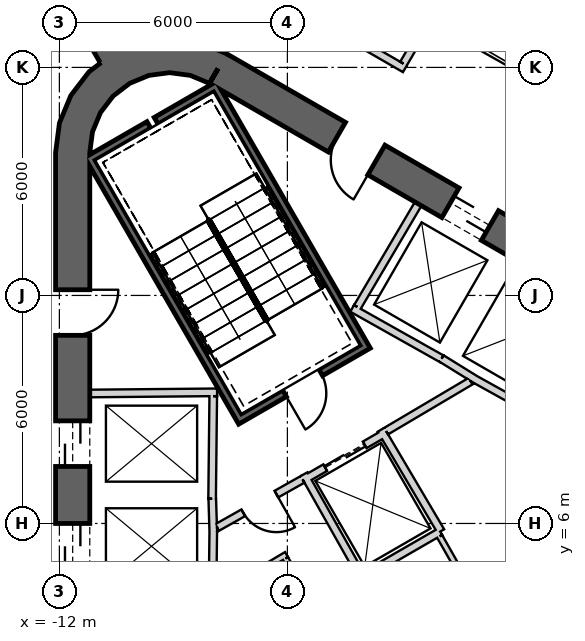
"""IFC4 building model, lengths in metres.
Left out: names, types, materials, properties, quantities, classifications, styles, units other than length and angle.
Written with IfcOpenShell. Run it as: python <this file> out.ifc"""

import sys

from ifc_helpers import new_model, si_unit, direction, frame, frame_2d, origin, place, context, subcontext, project, spatial, polyline, rectangle, outline, extrude, element, fill, save


model = new_model("IFC4")
c1 = context("Model", 3, precision=1e-05, world=origin(), true_north=direction((0.0, 1.0)))
c2 = subcontext(c1, "Body", "Model", "MODEL_VIEW")
j1 = project(units=[si_unit("LENGTHUNIT", "METRE"), si_unit("PLANEANGLEUNIT", "RADIAN")], contexts=[c1])
p1 = place(None, origin())
s1 = spatial("IfcSite", under=j1, at=p1, CompositionType="ELEMENT")
p2 = place(p1, origin())
s2 = spatial("IfcBuilding", under=s1, at=p2, CompositionType="ELEMENT")
p3 = place(p2, frame((0.0, 0.0, 27.5)))
s3 = spatial("IfcBuildingStorey", under=s2, at=p3, CompositionType="ELEMENT", Elevation=27.5)
p4 = place(p3, frame((19.475, 2.208, 0.0), z_axis=(0.0, 0.0, 1.0), x_axis=(-0.866028369851, 0.499994862586, 0.0)))
e1 = element("IfcWall", 1, at=p4, inside=s3, PredefinedType="SHEAR", context=c2, shape_type="SweptSolid", body=[
    extrude(rectangle(XDim=31.523, YDim=0.9, at=frame_2d((15.762, 0.0))), origin(), (0.0, 0.0, 1.0), 6.0),
])
p5 = place(p4, frame((7.062, 0.0, 0.0)))
e2 = element("IfcOpeningElement", 2, at=p5, cuts=e1, PredefinedType="OPENING", context=c2, shape_type="SweptSolid", body=[
    extrude(rectangle(XDim=1.2, YDim=2.4, at=frame_2d((0.6, 1.2))), frame((0.0, 0.46, 0.0), z_axis=(0.0, -1.0, 0.0), x_axis=(1.0, 0.0, 0.0)), (0.0, 0.0, 1.0), 0.92),
])
p6 = place(p4, frame((9.762, 0.0, 0.0)))
e3 = element("IfcOpeningElement", 3, at=p6, cuts=e1, PredefinedType="OPENING", context=c2, shape_type="SweptSolid", body=[
    extrude(rectangle(XDim=1.2, YDim=2.4, at=frame_2d((0.6, 1.2))), frame((0.0, 0.46, 0.0), z_axis=(0.0, -1.0, 0.0), x_axis=(1.0, 0.0, 0.0)), (0.0, 0.0, 1.0), 0.92),
])
p7 = place(p4, frame((12.462, 0.0, 0.0)))
e4 = element("IfcOpeningElement", 4, at=p7, cuts=e1, PredefinedType="OPENING", context=c2, shape_type="SweptSolid", body=[
    extrude(rectangle(XDim=1.2, YDim=2.4, at=frame_2d((0.6, 1.2))), frame((0.0, 0.46, 0.0), z_axis=(0.0, -1.0, 0.0), x_axis=(1.0, 0.0, 0.0)), (0.0, 0.0, 1.0), 0.92),
])
p8 = place(p4, frame((15.162, 0.0, 0.0)))
e5 = element("IfcOpeningElement", 5, at=p8, cuts=e1, PredefinedType="OPENING", context=c2, shape_type="SweptSolid", body=[
    extrude(rectangle(XDim=1.2, YDim=2.4, at=frame_2d((0.6, 1.2))), frame((0.0, 0.46, 0.0), z_axis=(0.0, -1.0, 0.0), x_axis=(1.0, 0.0, 0.0)), (0.0, 0.0, 1.0), 0.92),
])
p9 = place(p4, frame((17.862, 0.0, 0.0)))
e6 = element("IfcOpeningElement", 6, at=p9, cuts=e1, PredefinedType="OPENING", context=c2, shape_type="SweptSolid", body=[
    extrude(rectangle(XDim=1.2, YDim=2.4, at=frame_2d((0.6, 1.2))), frame((0.0, 0.46, 0.0), z_axis=(0.0, -1.0, 0.0), x_axis=(1.0, 0.0, 0.0)), (0.0, 0.0, 1.0), 0.92),
])
p10 = place(p4, frame((20.562, 0.0, 0.0)))
e7 = element("IfcOpeningElement", 7, at=p10, cuts=e1, PredefinedType="OPENING", context=c2, shape_type="SweptSolid", body=[
    extrude(rectangle(XDim=1.2, YDim=2.4, at=frame_2d((0.6, 1.2))), frame((0.0, 0.46, 0.0), z_axis=(0.0, -1.0, 0.0), x_axis=(1.0, 0.0, 0.0)), (0.0, 0.0, 1.0), 0.92),
])
p11 = place(p4, frame((23.262, 0.0, 0.0)))
e8 = element("IfcOpeningElement", 8, at=p11, cuts=e1, PredefinedType="OPENING", context=c2, shape_type="SweptSolid", body=[
    extrude(rectangle(XDim=1.2, YDim=2.4, at=frame_2d((0.6, 1.2))), frame((0.0, 0.46, 0.0), z_axis=(0.0, -1.0, 0.0), x_axis=(1.0, 0.0, 0.0)), (0.0, 0.0, 1.0), 0.92),
])
p12 = place(p4, frame((3.612, 0.0, 0.0)))
e9 = element("IfcOpeningElement", 9, at=p12, cuts=e1, PredefinedType="OPENING", context=c2, shape_type="SweptSolid", body=[
    extrude(rectangle(XDim=1.2, YDim=2.4, at=frame_2d((0.6, 1.2))), frame((0.0, 0.46, 0.0), z_axis=(0.0, -1.0, 0.0), x_axis=(1.0, 0.0, 0.0)), (0.0, 0.0, 1.0), 0.92),
])
p13 = place(p4, frame((26.712, 0.0, 0.0)))
e10 = element("IfcOpeningElement", 10, at=p13, cuts=e1, PredefinedType="OPENING", context=c2, shape_type="SweptSolid", body=[
    extrude(rectangle(XDim=1.2, YDim=2.4, at=frame_2d((0.6, 1.2))), frame((0.0, 0.46, 0.0), z_axis=(0.0, -1.0, 0.0), x_axis=(1.0, 0.0, 0.0)), (0.0, 0.0, 1.0), 0.92),
])
p14 = place(p3, frame((-11.65, 15.762, 0.0), z_axis=(0.0, 0.0, 1.0), x_axis=(0.0, -1.0, 0.0)))
e11 = element("IfcWall", 11, at=p14, inside=s3, PredefinedType="SHEAR", context=c2, shape_type="SweptSolid", body=[
    extrude(rectangle(XDim=31.523, YDim=0.9, at=frame_2d((15.762, 0.0))), origin(), (0.0, 0.0, 1.0), 6.0),
])
p15 = place(p14, frame((7.062, 0.0, 0.0)))
e12 = element("IfcOpeningElement", 12, at=p15, cuts=e11, PredefinedType="OPENING", context=c2, shape_type="SweptSolid", body=[
    extrude(rectangle(XDim=1.2, YDim=2.4, at=frame_2d((0.6, 1.2))), frame((0.0, 0.46, 0.0), z_axis=(0.0, -1.0, 0.0), x_axis=(1.0, 0.0, 0.0)), (0.0, 0.0, 1.0), 0.92),
])
p16 = place(p14, frame((9.762, 0.0, 0.0)))
e13 = element("IfcOpeningElement", 13, at=p16, cuts=e11, PredefinedType="OPENING", context=c2, shape_type="SweptSolid", body=[
    extrude(rectangle(XDim=1.2, YDim=2.4, at=frame_2d((0.6, 1.2))), frame((0.0, 0.46, 0.0), z_axis=(0.0, -1.0, 0.0), x_axis=(1.0, 0.0, 0.0)), (0.0, 0.0, 1.0), 0.92),
])
p17 = place(p14, frame((12.462, 0.0, 0.0)))
e14 = element("IfcOpeningElement", 14, at=p17, cuts=e11, PredefinedType="OPENING", context=c2, shape_type="SweptSolid", body=[
    extrude(rectangle(XDim=1.2, YDim=2.4, at=frame_2d((0.6, 1.2))), frame((0.0, 0.46, 0.0), z_axis=(0.0, -1.0, 0.0), x_axis=(1.0, 0.0, 0.0)), (0.0, 0.0, 1.0), 0.92),
])
p18 = place(p14, frame((15.162, 0.0, 0.0)))
e15 = element("IfcOpeningElement", 15, at=p18, cuts=e11, PredefinedType="OPENING", context=c2, shape_type="SweptSolid", body=[
    extrude(rectangle(XDim=1.2, YDim=2.4, at=frame_2d((0.6, 1.2))), frame((0.0, 0.46, 0.0), z_axis=(0.0, -1.0, 0.0), x_axis=(1.0, 0.0, 0.0)), (0.0, 0.0, 1.0), 0.92),
])
p19 = place(p14, frame((17.862, 0.0, 0.0)))
e16 = element("IfcOpeningElement", 16, at=p19, cuts=e11, PredefinedType="OPENING", context=c2, shape_type="SweptSolid", body=[
    extrude(rectangle(XDim=1.2, YDim=2.4, at=frame_2d((0.6, 1.2))), frame((0.0, 0.46, 0.0), z_axis=(0.0, -1.0, 0.0), x_axis=(1.0, 0.0, 0.0)), (0.0, 0.0, 1.0), 0.92),
])
p20 = place(p14, frame((20.562, 0.0, 0.0)))
e17 = element("IfcOpeningElement", 17, at=p20, cuts=e11, PredefinedType="OPENING", context=c2, shape_type="SweptSolid", body=[
    extrude(rectangle(XDim=1.2, YDim=2.4, at=frame_2d((0.6, 1.2))), frame((0.0, 0.46, 0.0), z_axis=(0.0, -1.0, 0.0), x_axis=(1.0, 0.0, 0.0)), (0.0, 0.0, 1.0), 0.92),
])
p21 = place(p14, frame((23.262, 0.0, 0.0)))
e18 = element("IfcOpeningElement", 18, at=p21, cuts=e11, PredefinedType="OPENING", context=c2, shape_type="SweptSolid", body=[
    extrude(rectangle(XDim=1.2, YDim=2.4, at=frame_2d((0.6, 1.2))), frame((0.0, 0.46, 0.0), z_axis=(0.0, -1.0, 0.0), x_axis=(1.0, 0.0, 0.0)), (0.0, 0.0, 1.0), 0.92),
])
p22 = place(p14, frame((3.612, 0.0, 0.0)))
e19 = element("IfcOpeningElement", 19, at=p22, cuts=e11, PredefinedType="OPENING", context=c2, shape_type="SweptSolid", body=[
    extrude(rectangle(XDim=1.2, YDim=2.4, at=frame_2d((0.6, 1.2))), frame((0.0, 0.46, 0.0), z_axis=(0.0, -1.0, 0.0), x_axis=(1.0, 0.0, 0.0)), (0.0, 0.0, 1.0), 0.92),
])
p23 = place(p14, frame((26.712, 0.0, 0.0)))
e20 = element("IfcOpeningElement", 20, at=p23, cuts=e11, PredefinedType="OPENING", context=c2, shape_type="SweptSolid", body=[
    extrude(rectangle(XDim=1.2, YDim=2.4, at=frame_2d((0.6, 1.2))), frame((0.0, 0.46, 0.0), z_axis=(0.0, -1.0, 0.0), x_axis=(1.0, 0.0, 0.0)), (0.0, 0.0, 1.0), 0.92),
])
p24 = place(p3, origin())
e21 = element("IfcWall", 21, at=p24, inside=s3, PredefinedType="SHEAR", context=c2, shape_type="SweptSolid", body=[
    extrude(outline(polyline([(-7.6, 18.36), (-8.323, 18.659), (-9.1, 18.762), (-9.876, 18.659), (-10.6, 18.36), (-11.221, 17.883), (-11.698, 17.262), (-11.998, 16.538), (-12.1, 15.762), (-11.2, 15.762), (-11.128, 16.305), (-10.919, 16.812), (-10.585, 17.247), (-10.15, 17.58), (-9.644, 17.79), (-9.1, 17.862), (-8.556, 17.79), (-8.05, 17.58), (-7.6, 18.36)])), origin(), (0.0, 0.0, 1.0), 6.0),
])
p25 = place(p3, frame((-10.575, 18.316, 0.0), z_axis=(0.0, 0.0, 1.0), x_axis=(-0.499996575515, 0.866027380903, 0.0)))
e22 = element("IfcWall", 22, at=p25, inside=s3, PredefinedType="SHEAR", context=c2, shape_type="SweptSolid", body=[
    extrude(rectangle(XDim=13.954, YDim=0.8, at=frame_2d((6.977, 0.0))), origin(), (0.0, 0.0, 1.0), 6.0),
])
p26 = place(p25, frame((2.05, 0.0, 0.0)))
e23 = element("IfcOpeningElement", 23, at=p26, cuts=e22, PredefinedType="OPENING", context=c2, shape_type="SweptSolid", body=[
    extrude(rectangle(XDim=1.4, YDim=2.4, at=frame_2d((0.7, 1.2))), frame((0.0, 0.41, 0.0), z_axis=(0.0, -1.0, 0.0), x_axis=(1.0, 0.0, 0.0)), (0.0, 0.0, 1.0), 0.82),
])
p27 = place(p3, frame((-11.2, 9.42, 0.0), z_axis=(0.0, 0.0, 1.0), x_axis=(0.999957167047, 0.009255488683, 0.0)))
e24 = element("IfcWall", 24, at=p27, inside=s3, PredefinedType="PLUMBINGWALL", context=c2, shape_type="SweptSolid", body=[
    extrude(rectangle(XDim=3.35, YDim=0.2, at=frame_2d((1.675, 0.0))), origin(), (0.0, 0.0, 1.0), 5.7),
])
p28 = place(p3, frame((-7.951, 9.35, 0.0), z_axis=(0.0, 0.0, 1.0), x_axis=(-0.011120469654, -0.999938165666, 0.0)))
e25 = element("IfcWall", 25, at=p28, inside=s3, PredefinedType="PLUMBINGWALL", context=c2, shape_type="SweptSolid", body=[
    extrude(rectangle(XDim=2.7, YDim=0.2, at=frame_2d((1.35, 0.0))), origin(), (0.0, 0.0, 1.0), 5.7),
])
p29 = place(p3, frame((-7.977, 6.65, 0.0), z_axis=(0.0, 0.0, 1.0), x_axis=(0.030861509705, -0.999523670164, 0.0)))
e26 = element("IfcWall", 26, at=p29, inside=s3, PredefinedType="PLUMBINGWALL", context=c2, shape_type="SweptSolid", body=[
    extrude(rectangle(XDim=0.878, YDim=0.2, at=frame_2d((0.439, 0.0))), origin(), (0.0, 0.0, 1.0), 5.7),
])
p30 = place(p3, frame((-7.949, 5.895, 0.0), z_axis=(0.0, 0.0, 1.0), x_axis=(-0.012042535896, -0.999927486035, 0.0)))
e27 = element("IfcWall", 27, at=p30, inside=s3, PredefinedType="PLUMBINGWALL", context=c2, shape_type="SweptSolid", body=[
    extrude(rectangle(XDim=1.845, YDim=0.2, at=frame_2d((0.922, 0.0))), origin(), (0.0, 0.0, 1.0), 5.7),
])
p31 = place(p3, frame((-1.941, 10.339, 0.0), z_axis=(0.0, 0.0, 1.0), x_axis=(0.850216889117, -0.526432561171, 0.0)))
e28 = element("IfcWall", 28, at=p31, inside=s3, PredefinedType="PLUMBINGWALL", context=c2, shape_type="SweptSolid", body=[
    extrude(rectangle(XDim=1.078, YDim=0.2, at=frame_2d((0.539, 0.0))), origin(), (0.0, 0.0, 1.0), 5.7),
])
p32 = place(p3, frame((0.483, 8.936, 0.0), z_axis=(0.0, 0.0, 1.0), x_axis=(-0.874269620932, 0.485440655401, 0.0)))
e29 = element("IfcWall", 29, at=p32, inside=s3, PredefinedType="PLUMBINGWALL", context=c2, shape_type="SweptSolid", body=[
    extrude(rectangle(XDim=1.845, YDim=0.2, at=frame_2d((0.922, 0.0))), origin(), (0.0, 0.0, 1.0), 5.7),
])
p33 = place(p3, frame((-4.296, 11.659, 0.0), z_axis=(0.0, 0.0, 1.0), x_axis=(0.871534483978, -0.490334215854, 0.0)))
e30 = element("IfcWall", 30, at=p33, inside=s3, PredefinedType="PLUMBINGWALL", context=c2, shape_type="SweptSolid", body=[
    extrude(rectangle(XDim=2.7, YDim=0.2, at=frame_2d((1.35, 0.0))), origin(), (0.0, 0.0, 1.0), 5.7),
])
p34 = place(p3, frame((-4.158, 11.696, 0.0), z_axis=(0.0, 0.0, 1.0), x_axis=(0.508018930956, 0.861345903683, 0.0)))
e31 = element("IfcWall", 31, at=p34, inside=s3, PredefinedType="PLUMBINGWALL", context=c2, shape_type="SweptSolid", body=[
    extrude(rectangle(XDim=3.15, YDim=0.2, at=frame_2d((1.575, 0.0))), origin(), (0.0, 0.0, 1.0), 5.7),
])
p35 = place(p3, frame((-11.245, 15.678, -0.3), z_axis=(0.0, 0.0, 1.0), x_axis=(0.499977274689, -0.866038523851, 0.0)))
e32 = element("IfcWall", 32, at=p35, inside=s3, PredefinedType="SHEAR", context=c2, shape_type="SweptSolid", body=[
    extrude(rectangle(XDim=8.1, YDim=0.2, at=frame_2d((4.05, 0.0))), origin(), (0.0, 0.0, 1.0), 6.0),
])
p36 = place(p3, frame((-7.818, 17.541, -0.3), z_axis=(0.0, 0.0, 1.0), x_axis=(-0.866088799389, -0.499890179513, 0.0)))
e33 = element("IfcWall", 33, at=p36, inside=s3, PredefinedType="SHEAR", context=c2, shape_type="SweptSolid", body=[
    extrude(rectangle(XDim=1.89, YDim=0.2, at=frame_2d((0.945, 0.0))), origin(), (0.0, 0.0, 1.0), 6.0),
])
p37 = place(p3, frame((-9.645, 16.486, -0.3), z_axis=(0.0, 0.0, 1.0), x_axis=(-0.866038843867, -0.499976720371, 0.0)))
e34 = element("IfcWall", 34, at=p37, inside=s3, PredefinedType="SHEAR", context=c2, shape_type="SweptSolid", body=[
    extrude(rectangle(XDim=1.69, YDim=0.2, at=frame_2d((0.845, 0.0))), origin(), (0.0, 0.0, 1.0), 6.0),
])
p38 = place(p3, frame((-7.854, 17.405, -0.3), z_axis=(0.0, 0.0, 1.0), x_axis=(0.499997992926, -0.866026562566, 0.0)))
e35 = element("IfcWall", 35, at=p38, inside=s3, PredefinedType="SHEAR", context=c2, shape_type="SweptSolid", body=[
    extrude(rectangle(XDim=7.9, YDim=0.2, at=frame_2d((3.95, 0.0))), origin(), (0.0, 0.0, 1.0), 6.0),
])
p39 = place(p3, frame((-7.159, 8.8, -0.3), z_axis=(0.0, 0.0, 1.0), x_axis=(0.866047807691, 0.499961193289, 0.0)))
e36 = element("IfcWall", 36, at=p39, inside=s3, PredefinedType="SHEAR", context=c2, shape_type="SweptSolid", body=[
    extrude(rectangle(XDim=3.6, YDim=0.2, at=frame_2d((1.8, 0.0))), origin(), (0.0, 0.0, 1.0), 6.0),
])
p40 = place(p39, frame((1.25, 0.0, 0.3)))
e37 = element("IfcOpeningElement", 37, at=p40, cuts=e36, PredefinedType="OPENING", context=c2, shape_type="SweptSolid", body=[
    extrude(rectangle(XDim=1.1, YDim=2.1, at=frame_2d((0.55, 1.05))), frame((0.0, 0.11, 0.0), z_axis=(0.0, -1.0, 0.0), x_axis=(1.0, 0.0, 0.0)), (0.0, 0.0, 1.0), 0.22),
])
p41 = place(p3, frame((-5.524, 7.168, 0.0), z_axis=(0.0, 0.0, 1.0), x_axis=(0.866024647952, 0.500001309137, 0.0)))
e38 = element("IfcWall", 38, at=p41, inside=s3, PredefinedType="PLUMBINGWALL", context=c2, shape_type="SweptSolid", body=[
    extrude(rectangle(XDim=2.4, YDim=0.2, at=frame_2d((1.2, 0.0))), origin(), (0.0, 0.0, 1.0), 5.7),
])
p42 = place(p41, frame((0.6, 0.0, 0.0)))
e39 = element("IfcOpeningElement", 39, at=p42, cuts=e38, PredefinedType="OPENING", context=c2, shape_type="SweptSolid", body=[
    extrude(rectangle(XDim=1.2, YDim=2.4, at=frame_2d((0.6, 1.2))), frame((0.0, 0.11, 0.0), z_axis=(0.0, -1.0, 0.0), x_axis=(1.0, 0.0, 0.0)), (0.0, 0.0, 1.0), 0.22),
])
p43 = place(p3, frame((-3.538, 8.465, 0.0), z_axis=(0.0, 0.0, 1.0), x_axis=(0.508647062354, -0.860975125052, 0.0)))
e40 = element("IfcWall", 40, at=p43, inside=s3, PredefinedType="PLUMBINGWALL", context=c2, shape_type="SweptSolid", body=[
    extrude(rectangle(XDim=3.1, YDim=0.2, at=frame_2d((1.55, 0.0))), origin(), (0.0, 0.0, 1.0), 5.7),
])
p44 = place(p3, frame((-1.979, 5.786, 0.0), z_axis=(0.0, 0.0, 1.0), x_axis=(-0.866016689309, -0.500015093611, 0.0)))
e41 = element("IfcWall", 41, at=p44, inside=s3, PredefinedType="PLUMBINGWALL", context=c2, shape_type="SweptSolid", body=[
    extrude(rectangle(XDim=2.479, YDim=0.2, at=frame_2d((1.24, 0.0))), origin(), (0.0, 0.0, 1.0), 5.7),
])
p45 = place(p3, frame((-5.562, 7.296, 0.0), z_axis=(0.0, 0.0, 1.0), x_axis=(0.49134651263, -0.870964180966, 0.0)))
e42 = element("IfcWall", 42, at=p45, inside=s3, PredefinedType="PLUMBINGWALL", context=c2, shape_type="SweptSolid", body=[
    extrude(rectangle(XDim=3.0, YDim=0.2, at=frame_2d((1.5, 0.0))), origin(), (0.0, 0.0, 1.0), 5.7),
])
p46 = place(p3, frame((-1.18, 9.744, 0.0), z_axis=(0.0, 0.0, 1.0), x_axis=(-0.860615607571, -0.509255118781, 0.0)))
e43 = element("IfcWall", 43, at=p46, inside=s3, PredefinedType="PARTITIONING", context=c2, shape_type="SweptSolid", body=[
    extrude(rectangle(XDim=2.581, YDim=0.2, at=frame_2d((1.29, 0.0))), origin(), (0.0, 0.0, 1.0), 5.7),
])
p47 = place(p3, frame((-5.6, 7.16, 0.0), z_axis=(0.0, 0.0, 1.0), x_axis=(-0.871363259478, -0.490638431059, 0.0)))
e44 = element("IfcWall", 44, at=p47, inside=s3, PredefinedType="PARTITIONING", context=c2, shape_type="SweptSolid", body=[
    extrude(rectangle(XDim=2.581, YDim=0.2, at=frame_2d((1.291, 0.0))), origin(), (0.0, 0.0, 1.0), 5.7),
])
p48 = place(p47, frame((0.791, 0.0, 0.0)))
e45 = element("IfcOpeningElement", 45, at=p48, cuts=e44, PredefinedType="OPENING", context=c2, shape_type="SweptSolid", body=[
    extrude(rectangle(XDim=1.0, YDim=2.1, at=frame_2d((0.5, 1.05))), frame((0.0, 0.11, 0.0), z_axis=(0.0, -1.0, 0.0), x_axis=(1.0, 0.0, 0.0)), (0.0, 0.0, 1.0), 0.22),
])
p49 = place(p3, frame((-1.994, 5.661, 0.0), z_axis=(0.0, 0.0, 1.0), x_axis=(0.494341211302, -0.869267948798, 0.0)))
e46 = element("IfcWall", 46, at=p49, inside=s3, PredefinedType="PLUMBINGWALL", context=c2, shape_type="SweptSolid", body=[
    extrude(rectangle(XDim=4.361, YDim=0.15, at=frame_2d((2.18, 0.0))), origin(), (0.0, 0.0, 1.0), 5.7),
])
p50 = place(p3, frame((-6.024, 5.183, 0.0), z_axis=(0.0, 0.0, 1.0), x_axis=(-0.860126804455, -0.510080268447, 0.0)))
e47 = element("IfcWall", 47, at=p50, inside=s3, PredefinedType="PLUMBINGWALL", context=c2, shape_type="SweptSolid", body=[
    extrude(rectangle(XDim=2.24, YDim=0.15, at=frame_2d((1.12, 0.0))), origin(), (0.0, 0.0, 1.0), 5.7),
])
p51 = place(p3, frame((-4.551, 2.482, 0.0), z_axis=(0.0, 0.0, 1.0), x_axis=(-0.499990139034, 0.866031096941, 0.0)))
e48 = element("IfcWall", 48, at=p51, inside=s3, PredefinedType="PLUMBINGWALL", context=c2, shape_type="SweptSolid", body=[
    extrude(rectangle(XDim=3.0, YDim=0.15, at=frame_2d((1.5, 0.0))), origin(), (0.0, 0.0, 1.0), 5.7),
])
p52 = place(p3, frame((-2.909, 17.962, 0.0), z_axis=(0.0, 0.0, 1.0), x_axis=(-0.866156637233, 0.499772628079, 0.0)))
e49 = element("IfcWall", 49, at=p52, inside=s3, PredefinedType="PARTITIONING", context=c2, shape_type="SweptSolid", body=[
    extrude(rectangle(XDim=3.931, YDim=0.2, at=frame_2d((1.966, 0.0))), origin(), (0.0, 0.0, 1.0), 4.88),
])
p53 = place(p3, frame((-2.945, 18.098, 0.0), z_axis=(0.0, 0.0, 1.0), x_axis=(0.503235430028, 0.864149351654, 0.0)))
e50 = element("IfcWall", 50, at=p53, inside=s3, PredefinedType="PARTITIONING", context=c2, shape_type="SweptSolid", body=[
    extrude(rectangle(XDim=8.002, YDim=0.2, at=frame_2d((4.001, 0.0))), origin(), (0.0, 0.0, 1.0), 5.17),
])
p54 = place(p53, frame((3.402, 0.0, 0.0)))
e51 = element("IfcOpeningElement", 51, at=p54, cuts=e50, PredefinedType="OPENING", context=c2, shape_type="SweptSolid", body=[
    extrude(rectangle(XDim=1.0, YDim=2.1, at=frame_2d((0.5, 1.05))), frame((0.0, 0.11, 0.0), z_axis=(0.0, -1.0, 0.0), x_axis=(1.0, 0.0, 0.0)), (0.0, 0.0, 1.0), 0.22),
])
p55 = place(p40, origin())
e52 = element("IfcDoor", 52, at=p55, inside=s3, OperationType="SINGLE_SWING_LEFT", PredefinedType="USERDEFINED", context=c2, shape_type="SweptSolid", body=[
    extrude(rectangle(XDim=1.1, YDim=2.1, at=frame_2d((0.55, 1.05))), frame((0.0, 0.025, 0.0), z_axis=(0.0, -1.0, 0.0), x_axis=(1.0, 0.0, 0.0)), (0.0, 0.0, 1.0), 0.05),
])
fill(e37, e52)
p56 = place(p48, origin())
e53 = element("IfcDoor", 53, at=p56, inside=s3, OperationType="SINGLE_SWING_LEFT", PredefinedType="USERDEFINED", context=c2, shape_type="SweptSolid", body=[
    extrude(rectangle(XDim=1.0, YDim=2.1, at=frame_2d((0.5, 1.05))), frame((0.0, 0.025, 0.0), z_axis=(0.0, -1.0, 0.0), x_axis=(1.0, 0.0, 0.0)), (0.0, 0.0, 1.0), 0.05),
])
fill(e45, e53)
p57 = place(p42, origin())
e54 = element("IfcDoor", 54, at=p57, inside=s3, OperationType="SLIDING_TO_LEFT", PredefinedType="USERDEFINED", context=c2, shape_type="SweptSolid", body=[
    extrude(rectangle(XDim=1.2, YDim=2.4, at=frame_2d((0.6, 1.2))), frame((0.0, 0.025, 0.0), z_axis=(0.0, -1.0, 0.0), x_axis=(1.0, 0.0, 0.0)), (0.0, 0.0, 1.0), 0.05),
])
fill(e39, e54)
p58 = place(p15, origin())
e55 = element("IfcDoor", 55, at=p58, inside=s3, OperationType="SLIDING_TO_LEFT", PredefinedType="USERDEFINED", context=c2, shape_type="SweptSolid", body=[
    extrude(rectangle(XDim=1.2, YDim=2.4, at=frame_2d((0.6, 1.2))), frame((0.0, 0.025, 0.0), z_axis=(0.0, -1.0, 0.0), x_axis=(1.0, 0.0, 0.0)), (0.0, 0.0, 1.0), 0.05),
])
fill(e12, e55)
p59 = place(p16, origin())
e56 = element("IfcDoor", 56, at=p59, inside=s3, OperationType="SLIDING_TO_LEFT", PredefinedType="USERDEFINED", context=c2, shape_type="SweptSolid", body=[
    extrude(rectangle(XDim=1.2, YDim=2.4, at=frame_2d((0.6, 1.2))), frame((0.0, 0.025, 0.0), z_axis=(0.0, -1.0, 0.0), x_axis=(1.0, 0.0, 0.0)), (0.0, 0.0, 1.0), 0.05),
])
fill(e13, e56)
p60 = place(p11, origin())
e57 = element("IfcDoor", 57, at=p60, inside=s3, OperationType="SLIDING_TO_LEFT", PredefinedType="USERDEFINED", context=c2, shape_type="SweptSolid", body=[
    extrude(rectangle(XDim=1.2, YDim=2.4, at=frame_2d((0.6, 1.2))), frame((0.0, 0.025, 0.0), z_axis=(0.0, -1.0, 0.0), x_axis=(1.0, 0.0, 0.0)), (0.0, 0.0, 1.0), 0.05),
])
fill(e8, e57)
p61 = place(p13, origin())
e58 = element("IfcDoor", 58, at=p61, inside=s3, OperationType="SINGLE_SWING_LEFT", PredefinedType="USERDEFINED", context=c2, shape_type="SweptSolid", body=[
    extrude(rectangle(XDim=1.2, YDim=2.4, at=frame_2d((0.6, 1.2))), frame((0.0, 0.025, 0.0), z_axis=(0.0, -1.0, 0.0), x_axis=(1.0, 0.0, 0.0)), (0.0, 0.0, 1.0), 0.05),
])
fill(e10, e58)
p62 = place(p22, origin())
e59 = element("IfcDoor", 59, at=p62, inside=s3, OperationType="SINGLE_SWING_LEFT", PredefinedType="USERDEFINED", context=c2, shape_type="SweptSolid", body=[
    extrude(rectangle(XDim=1.2, YDim=2.4, at=frame_2d((0.6, 1.2))), frame((0.0, 0.025, 0.0), z_axis=(0.0, -1.0, 0.0), x_axis=(1.0, 0.0, 0.0)), (0.0, 0.0, 1.0), 0.05),
])
fill(e19, e59)
save(model, sys.argv[1])
